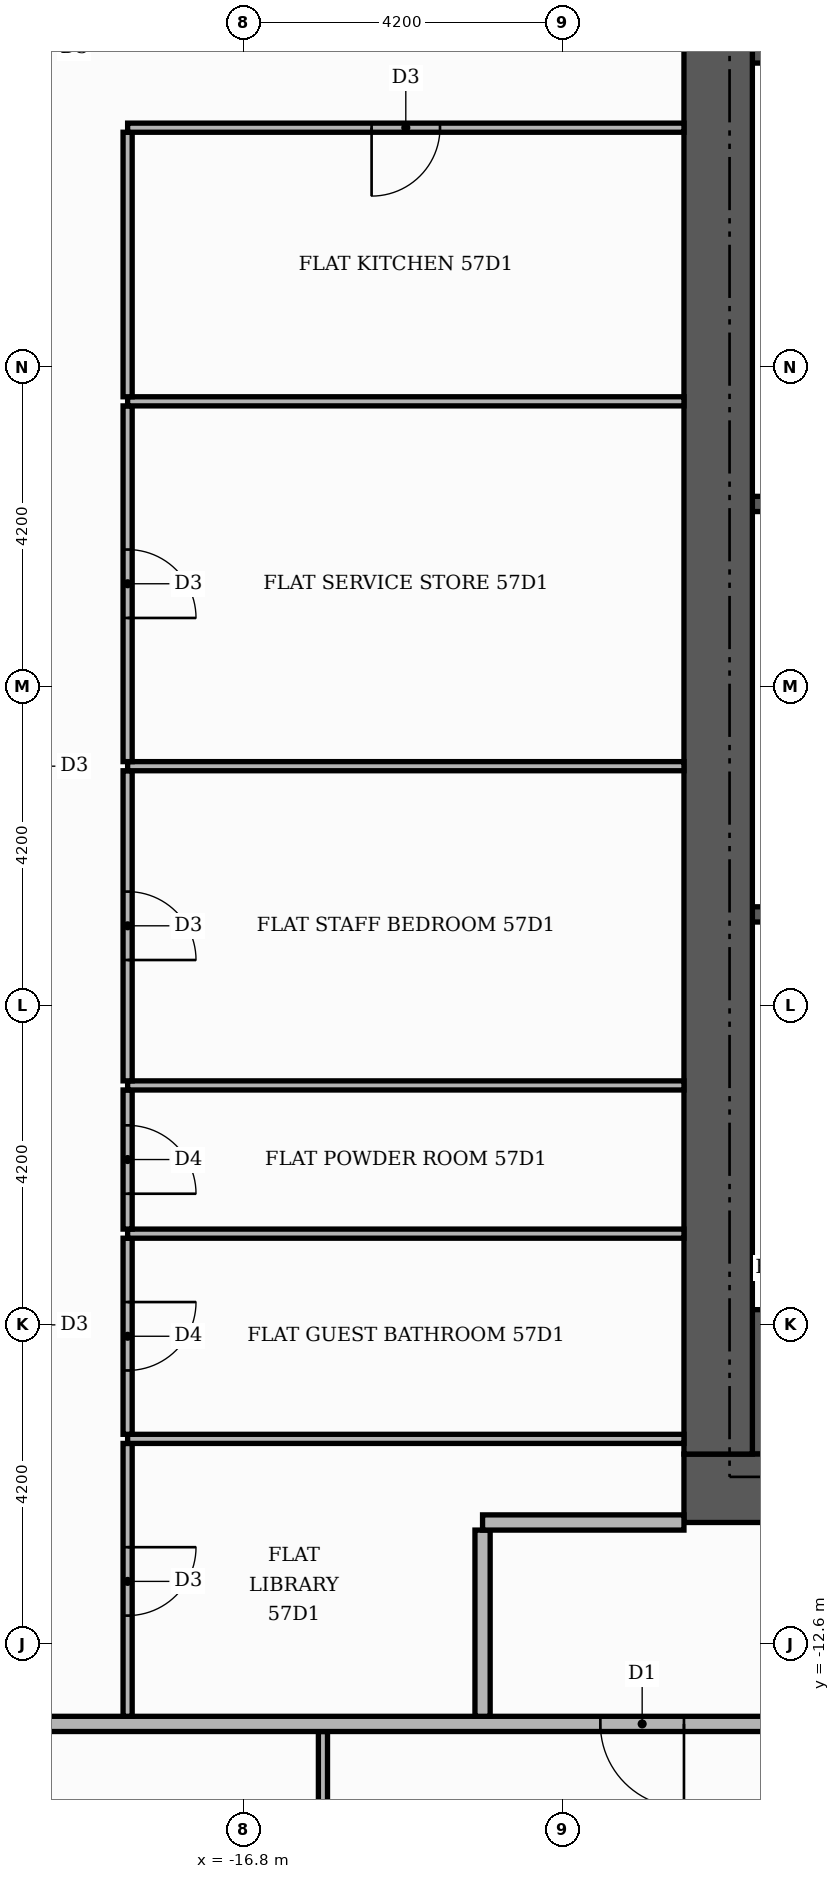
"""IFC4 building model, lengths in metres.
Left out: names, types, materials, properties, quantities, classifications, styles, units other than length and angle.
Written with IfcOpenShell. Run it as: python <this file> out.ifc"""

import sys

from ifc_helpers import new_model, si_unit, direction, frame, frame_2d, origin, place, context, subcontext, project, spatial, rectangle, extrude, element, fill, save


model = new_model("IFC4")
c1 = context("Model", 3, precision=1e-05, world=origin(), true_north=direction((0.0, 1.0)))
c2 = subcontext(c1, "Body", "Model", "MODEL_VIEW")
j1 = project(units=[si_unit("LENGTHUNIT", "METRE"), si_unit("PLANEANGLEUNIT", "RADIAN")], contexts=[c1])
p1 = place(None, origin())
s1 = spatial("IfcSite", under=j1, at=p1, CompositionType="ELEMENT")
p2 = place(p1, origin())
s2 = spatial("IfcBuilding", under=s1, at=p2, CompositionType="ELEMENT")
p3 = place(p2, frame((0.0, 0.0, 240.6)))
s3 = spatial("IfcBuildingStorey", under=s2, at=p3, CompositionType="ELEMENT", Elevation=240.6)
for number, where, z_axis, x_axis in (
    (1, (-10.1, -9.15, 0.0), (0.0, 0.0, 1.0), (1.0, 0.0, 0.0)),
    (2, (-10.1, 9.15, 0.0), (0.0, 0.0, 1.0), (1.0, 0.0, 0.0)),
):
    element("IfcWall", number, at=place(p3, frame(where, z_axis=z_axis, x_axis=x_axis)), inside=s3, PredefinedType="SHEAR", context=c2, shape_type="SweptSolid", body=[
        extrude(rectangle(XDim=4.6, YDim=1.9, at=frame_2d((2.3, 0.0))), origin(), (0.0, 0.0, 1.0), 3.48),
    ])
for number, where, z_axis, x_axis in (
    (3, (-10.1, -3.0, 0.0), (0.0, 0.0, 1.0), (1.0, 0.0, 0.0)),
    (4, (-10.1, 2.4, 0.0), (0.0, 0.0, 1.0), (1.0, 0.0, 0.0)),
):
    element("IfcWall", number, at=place(p3, frame(where, z_axis=z_axis, x_axis=x_axis)), inside=s3, PredefinedType="SHEAR", context=c2, shape_type="SweptSolid", body=[
        extrude(rectangle(XDim=0.9, YDim=0.2, at=frame_2d((0.45, 0.0))), origin(), (0.0, 0.0, 1.0), 3.48),
    ])
p4 = place(p3, frame((-11.0, -10.55, 0.0), z_axis=(0.0, 0.0, 1.0), x_axis=(1.0, 0.0, 0.0)))
e5 = element("IfcWall", 5, at=p4, inside=s3, PredefinedType="SHEAR", context=c2, shape_type="SweptSolid", body=[
    extrude(rectangle(XDim=22.0, YDim=0.9, at=frame_2d((11.0, 0.0))), origin(), (0.0, 0.0, 1.0), 3.48),
])
p5 = place(p4, frame((7.4, 0.0, 0.0)))
e6 = element("IfcOpeningElement", 6, at=p5, cuts=e5, PredefinedType="OPENING", context=c2, shape_type="SweptSolid", body=[
    extrude(rectangle(XDim=1.8, YDim=2.2, at=frame_2d((0.9, 1.1))), frame((0.0, 0.46, 0.0), z_axis=(0.0, -1.0, 0.0), x_axis=(1.0, 0.0, 0.0)), (0.0, 0.0, 1.0), 0.92),
])
p6 = place(p3, frame((-10.55, -10.1, 0.0), z_axis=(0.0, 0.0, 1.0), x_axis=(0.0, 1.0, 0.0)))
e7 = element("IfcWall", 7, at=p6, inside=s3, PredefinedType="SHEAR", context=c2, shape_type="SweptSolid", body=[
    extrude(rectangle(XDim=20.2, YDim=0.9, at=frame_2d((10.1, 0.0))), origin(), (0.0, 0.0, 1.0), 3.48),
])
p7 = place(p3, frame((-15.75, -20.06, 0.0), z_axis=(0.0, 0.0, 1.0), x_axis=(0.0, 1.0, 0.0)))
e8 = element("IfcWall", 8, at=p7, inside=s3, PredefinedType="PARTITIONING", context=c2, shape_type="SweptSolid", body=[
    extrude(rectangle(XDim=6.31, YDim=0.12, at=frame_2d((3.155, 0.0))), origin(), (0.0, 0.0, 1.0), 3.48),
])
p8 = place(p7, frame((2.725, 0.0, 0.0)))
e9 = element("IfcOpeningElement", 9, at=p8, cuts=e8, PredefinedType="OPENING", context=c2, shape_type="SweptSolid", body=[
    extrude(rectangle(XDim=0.9, YDim=2.1, at=frame_2d((0.45, 1.05))), frame((0.0, 0.07, 0.0), z_axis=(0.0, -1.0, 0.0), x_axis=(1.0, 0.0, 0.0)), (0.0, 0.0, 1.0), 0.14),
])
p9 = place(p3, frame((-25.42, -13.65, 0.0), z_axis=(0.0, 0.0, 1.0), x_axis=(1.0, 0.0, 0.0)))
e10 = element("IfcWall", 10, at=p9, inside=s3, PredefinedType="PARTITIONING", context=c2, shape_type="SweptSolid", body=[
    extrude(rectangle(XDim=39.07, YDim=0.2, at=frame_2d((19.535, 0.0))), origin(), (0.0, 0.0, 1.0), 3.48),
])
p10 = place(p9, frame((13.32, 0.0, 0.0)))
e11 = element("IfcOpeningElement", 11, at=p10, cuts=e10, PredefinedType="OPENING", context=c2, shape_type="SweptSolid", body=[
    extrude(rectangle(XDim=1.1, YDim=2.4, at=frame_2d((0.55, 1.2))), frame((0.0, 0.11, 0.0), z_axis=(0.0, -1.0, 0.0), x_axis=(1.0, 0.0, 0.0)), (0.0, 0.0, 1.0), 0.22),
])
p11 = place(p3, frame((-18.32, -13.55, 0.0), z_axis=(0.0, 0.0, 1.0), x_axis=(0.0, 1.0, 0.0)))
e12 = element("IfcWall", 12, at=p11, inside=s3, PredefinedType="PARTITIONING", context=c2, shape_type="SweptSolid", body=[
    extrude(rectangle(XDim=3.59, YDim=0.12, at=frame_2d((1.795, 0.0))), origin(), (0.0, 0.0, 1.0), 3.48),
])
p12 = place(p11, frame((1.325, 0.0, 0.0)))
e13 = element("IfcOpeningElement", 13, at=p12, cuts=e12, PredefinedType="OPENING", context=c2, shape_type="SweptSolid", body=[
    extrude(rectangle(XDim=0.9, YDim=2.1, at=frame_2d((0.45, 1.05))), frame((0.0, 0.07, 0.0), z_axis=(0.0, -1.0, 0.0), x_axis=(1.0, 0.0, 0.0)), (0.0, 0.0, 1.0), 0.14),
])
p13 = place(p3, frame((-13.65, -13.55, 0.0), z_axis=(0.0, 0.0, 1.0), x_axis=(0.0, 1.0, 0.0)))
e14 = element("IfcWall", 14, at=p13, inside=s3, PredefinedType="PARTITIONING", context=c2, shape_type="SweptSolid", body=[
    extrude(rectangle(XDim=2.45, YDim=0.2, at=frame_2d((1.225, 0.0))), origin(), (0.0, 0.0, 1.0), 3.48),
])
p14 = place(p3, frame((-13.65, -11.0, 0.0), z_axis=(0.0, 0.0, 1.0), x_axis=(1.0, 0.0, 0.0)))
e15 = element("IfcWall", 15, at=p14, inside=s3, PredefinedType="PARTITIONING", context=c2, shape_type="SweptSolid", body=[
    extrude(rectangle(XDim=2.65, YDim=0.2, at=frame_2d((1.325, 0.0))), origin(), (0.0, 0.0, 1.0), 3.48),
])
p15 = place(p3, frame((-18.32, -9.9, 0.0), z_axis=(0.0, 0.0, 1.0), x_axis=(1.0, 0.0, 0.0)))
e16 = element("IfcWall", 16, at=p15, inside=s3, PredefinedType="PARTITIONING", context=c2, shape_type="SweptSolid", body=[
    extrude(rectangle(XDim=7.32, YDim=0.12, at=frame_2d((3.66, 0.0))), origin(), (0.0, 0.0, 1.0), 3.48),
])
p16 = place(p3, frame((-18.32, -9.84, 0.0), z_axis=(0.0, 0.0, 1.0), x_axis=(0.0, 1.0, 0.0)))
e17 = element("IfcWall", 17, at=p16, inside=s3, PredefinedType="PARTITIONING", context=c2, shape_type="SweptSolid", body=[
    extrude(rectangle(XDim=2.58, YDim=0.12, at=frame_2d((1.29, 0.0))), origin(), (0.0, 0.0, 1.0), 3.48),
])
p17 = place(p16, frame((0.84, 0.0, 0.0)))
e18 = element("IfcOpeningElement", 18, at=p17, cuts=e17, PredefinedType="OPENING", context=c2, shape_type="SweptSolid", body=[
    extrude(rectangle(XDim=0.9, YDim=2.1, at=frame_2d((0.45, 1.05))), frame((0.0, 0.07, 0.0), z_axis=(0.0, -1.0, 0.0), x_axis=(1.0, 0.0, 0.0)), (0.0, 0.0, 1.0), 0.14),
])
p18 = place(p3, frame((-18.32, -7.2, 0.0), z_axis=(0.0, 0.0, 1.0), x_axis=(1.0, 0.0, 0.0)))
e19 = element("IfcWall", 19, at=p18, inside=s3, PredefinedType="PARTITIONING", context=c2, shape_type="SweptSolid", body=[
    extrude(rectangle(XDim=7.32, YDim=0.12, at=frame_2d((3.66, 0.0))), origin(), (0.0, 0.0, 1.0), 3.48),
])
p19 = place(p3, frame((-18.32, -7.14, 0.0), z_axis=(0.0, 0.0, 1.0), x_axis=(0.0, 1.0, 0.0)))
e20 = element("IfcWall", 20, at=p19, inside=s3, PredefinedType="PARTITIONING", context=c2, shape_type="SweptSolid", body=[
    extrude(rectangle(XDim=1.83, YDim=0.12, at=frame_2d((0.915, 0.0))), origin(), (0.0, 0.0, 1.0), 3.48),
])
p20 = place(p19, frame((0.465, 0.0, 0.0)))
e21 = element("IfcOpeningElement", 21, at=p20, cuts=e20, PredefinedType="OPENING", context=c2, shape_type="SweptSolid", body=[
    extrude(rectangle(XDim=0.9, YDim=2.1, at=frame_2d((0.45, 1.05))), frame((0.0, 0.07, 0.0), z_axis=(0.0, -1.0, 0.0), x_axis=(1.0, 0.0, 0.0)), (0.0, 0.0, 1.0), 0.14),
])
p21 = place(p3, frame((-18.32, -5.25, 0.0), z_axis=(0.0, 0.0, 1.0), x_axis=(1.0, 0.0, 0.0)))
e22 = element("IfcWall", 22, at=p21, inside=s3, PredefinedType="PARTITIONING", context=c2, shape_type="SweptSolid", body=[
    extrude(rectangle(XDim=7.32, YDim=0.12, at=frame_2d((3.66, 0.0))), origin(), (0.0, 0.0, 1.0), 3.48),
])
p22 = place(p3, frame((-18.32, -5.19, 0.0), z_axis=(0.0, 0.0, 1.0), x_axis=(0.0, 1.0, 0.0)))
e23 = element("IfcWall", 23, at=p22, inside=s3, PredefinedType="PARTITIONING", context=c2, shape_type="SweptSolid", body=[
    extrude(rectangle(XDim=4.08, YDim=0.12, at=frame_2d((2.04, 0.0))), origin(), (0.0, 0.0, 1.0), 3.48),
])
p23 = place(p22, frame((1.59, 0.0, 0.0)))
e24 = element("IfcOpeningElement", 24, at=p23, cuts=e23, PredefinedType="OPENING", context=c2, shape_type="SweptSolid", body=[
    extrude(rectangle(XDim=0.9, YDim=2.1, at=frame_2d((0.45, 1.05))), frame((0.0, 0.07, 0.0), z_axis=(0.0, -1.0, 0.0), x_axis=(1.0, 0.0, 0.0)), (0.0, 0.0, 1.0), 0.14),
])
p24 = place(p3, frame((-18.32, -1.05, 0.0), z_axis=(0.0, 0.0, 1.0), x_axis=(1.0, 0.0, 0.0)))
e25 = element("IfcWall", 25, at=p24, inside=s3, PredefinedType="PARTITIONING", context=c2, shape_type="SweptSolid", body=[
    extrude(rectangle(XDim=7.32, YDim=0.12, at=frame_2d((3.66, 0.0))), origin(), (0.0, 0.0, 1.0), 3.48),
])
p25 = place(p3, frame((-18.32, -0.99, 0.0), z_axis=(0.0, 0.0, 1.0), x_axis=(0.0, 1.0, 0.0)))
e26 = element("IfcWall", 26, at=p25, inside=s3, PredefinedType="PARTITIONING", context=c2, shape_type="SweptSolid", body=[
    extrude(rectangle(XDim=4.68, YDim=0.12, at=frame_2d((2.34, 0.0))), origin(), (0.0, 0.0, 1.0), 3.48),
])
p26 = place(p25, frame((1.89, 0.0, 0.0)))
e27 = element("IfcOpeningElement", 27, at=p26, cuts=e26, PredefinedType="OPENING", context=c2, shape_type="SweptSolid", body=[
    extrude(rectangle(XDim=0.9, YDim=2.1, at=frame_2d((0.45, 1.05))), frame((0.0, 0.07, 0.0), z_axis=(0.0, -1.0, 0.0), x_axis=(1.0, 0.0, 0.0)), (0.0, 0.0, 1.0), 0.14),
])
p27 = place(p3, frame((-18.32, 3.75, 0.0), z_axis=(0.0, 0.0, 1.0), x_axis=(1.0, 0.0, 0.0)))
e28 = element("IfcWall", 28, at=p27, inside=s3, PredefinedType="PARTITIONING", context=c2, shape_type="SweptSolid", body=[
    extrude(rectangle(XDim=7.32, YDim=0.12, at=frame_2d((3.66, 0.0))), origin(), (0.0, 0.0, 1.0), 3.48),
])
p28 = place(p3, frame((-18.32, 3.81, 0.0), z_axis=(0.0, 0.0, 1.0), x_axis=(0.0, 1.0, 0.0)))
e29 = element("IfcWall", 29, at=p28, inside=s3, PredefinedType="PARTITIONING", context=c2, shape_type="SweptSolid", body=[
    extrude(rectangle(XDim=3.48, YDim=0.12, at=frame_2d((1.74, 0.0))), origin(), (0.0, 0.0, 1.0), 3.48),
])
p29 = place(p3, frame((-18.32, 7.35, 0.0), z_axis=(0.0, 0.0, 1.0), x_axis=(1.0, 0.0, 0.0)))
e30 = element("IfcWall", 30, at=p29, inside=s3, PredefinedType="PARTITIONING", context=c2, shape_type="SweptSolid", body=[
    extrude(rectangle(XDim=7.32, YDim=0.12, at=frame_2d((3.66, 0.0))), origin(), (0.0, 0.0, 1.0), 3.48),
])
p30 = place(p29, frame((3.21, 0.0, 0.0)))
e31 = element("IfcOpeningElement", 31, at=p30, cuts=e30, PredefinedType="OPENING", context=c2, shape_type="SweptSolid", body=[
    extrude(rectangle(XDim=0.9, YDim=2.1, at=frame_2d((0.45, 1.05))), frame((0.0, 0.07, 0.0), z_axis=(0.0, -1.0, 0.0), x_axis=(1.0, 0.0, 0.0)), (0.0, 0.0, 1.0), 0.14),
])
p31 = place(p10, frame((1.1, 0.0, 0.0), z_axis=(0.0, 0.0, 1.0), x_axis=(-1.0, 0.0, 0.0)))
e32 = element("IfcDoor", 32, at=p31, inside=s3, OperationType="SINGLE_SWING_RIGHT", PredefinedType="DOOR", context=c2, shape_type="SweptSolid", body=[
    extrude(rectangle(XDim=1.1, YDim=2.4, at=frame_2d((0.55, 1.2))), frame((0.0, 0.025, 0.0), z_axis=(0.0, -1.0, 0.0), x_axis=(1.0, 0.0, 0.0)), (0.0, 0.0, 1.0), 0.05),
])
fill(e11, e32)
p32 = place(p30, frame((0.9, 0.0, 0.0), z_axis=(0.0, 0.0, 1.0), x_axis=(-1.0, 0.0, 0.0)))
e33 = element("IfcDoor", 33, at=p32, inside=s3, OperationType="SINGLE_SWING_LEFT", PredefinedType="DOOR", context=c2, shape_type="SweptSolid", body=[
    extrude(rectangle(XDim=0.9, YDim=2.1, at=frame_2d((0.45, 1.05))), frame((0.0, 0.025, 0.0), z_axis=(0.0, -1.0, 0.0), x_axis=(1.0, 0.0, 0.0)), (0.0, 0.0, 1.0), 0.05),
])
fill(e31, e33)
p33 = place(p26, frame((0.9, 0.0, 0.0), z_axis=(0.0, 0.0, 1.0), x_axis=(-1.0, 0.0, 0.0)))
e34 = element("IfcDoor", 34, at=p33, inside=s3, OperationType="SINGLE_SWING_LEFT", PredefinedType="DOOR", context=c2, shape_type="SweptSolid", body=[
    extrude(rectangle(XDim=0.9, YDim=2.1, at=frame_2d((0.45, 1.05))), frame((0.0, 0.025, 0.0), z_axis=(0.0, -1.0, 0.0), x_axis=(1.0, 0.0, 0.0)), (0.0, 0.0, 1.0), 0.05),
])
fill(e27, e34)
p34 = place(p23, frame((0.9, 0.0, 0.0), z_axis=(0.0, 0.0, 1.0), x_axis=(-1.0, 0.0, 0.0)))
e35 = element("IfcDoor", 35, at=p34, inside=s3, OperationType="SINGLE_SWING_LEFT", PredefinedType="DOOR", context=c2, shape_type="SweptSolid", body=[
    extrude(rectangle(XDim=0.9, YDim=2.1, at=frame_2d((0.45, 1.05))), frame((0.0, 0.025, 0.0), z_axis=(0.0, -1.0, 0.0), x_axis=(1.0, 0.0, 0.0)), (0.0, 0.0, 1.0), 0.05),
])
fill(e24, e35)
p35 = place(p20, frame((0.9, 0.0, 0.0), z_axis=(0.0, 0.0, 1.0), x_axis=(-1.0, 0.0, 0.0)))
e36 = element("IfcDoor", 36, at=p35, inside=s3, OperationType="SINGLE_SWING_LEFT", PredefinedType="DOOR", context=c2, shape_type="SweptSolid", body=[
    extrude(rectangle(XDim=0.9, YDim=2.1, at=frame_2d((0.45, 1.05))), frame((0.0, 0.025, 0.0), z_axis=(0.0, -1.0, 0.0), x_axis=(1.0, 0.0, 0.0)), (0.0, 0.0, 1.0), 0.05),
])
fill(e21, e36)
p36 = place(p17, frame((0.9, 0.0, 0.0), z_axis=(0.0, 0.0, 1.0), x_axis=(-1.0, 0.0, 0.0)))
e37 = element("IfcDoor", 37, at=p36, inside=s3, OperationType="SINGLE_SWING_RIGHT", PredefinedType="DOOR", context=c2, shape_type="SweptSolid", body=[
    extrude(rectangle(XDim=0.9, YDim=2.1, at=frame_2d((0.45, 1.05))), frame((0.0, 0.025, 0.0), z_axis=(0.0, -1.0, 0.0), x_axis=(1.0, 0.0, 0.0)), (0.0, 0.0, 1.0), 0.05),
])
fill(e18, e37)
p37 = place(p12, frame((0.9, 0.0, 0.0), z_axis=(0.0, 0.0, 1.0), x_axis=(-1.0, 0.0, 0.0)))
e38 = element("IfcDoor", 38, at=p37, inside=s3, OperationType="SINGLE_SWING_RIGHT", PredefinedType="DOOR", context=c2, shape_type="SweptSolid", body=[
    extrude(rectangle(XDim=0.9, YDim=2.1, at=frame_2d((0.45, 1.05))), frame((0.0, 0.025, 0.0), z_axis=(0.0, -1.0, 0.0), x_axis=(1.0, 0.0, 0.0)), (0.0, 0.0, 1.0), 0.05),
])
fill(e13, e38)
save(model, sys.argv[1])
